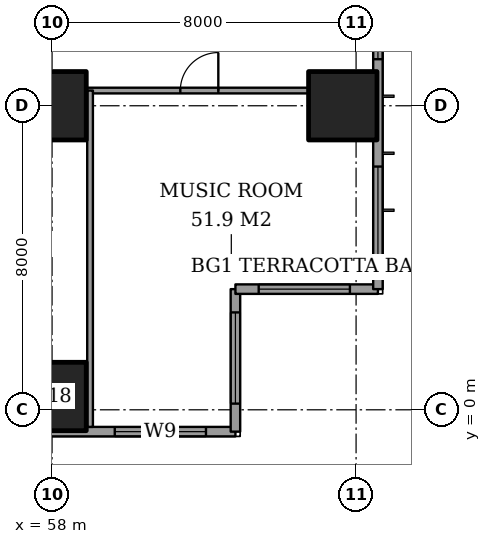
"""IFC4 building model, lengths in metres.
Left out: names, types, materials, properties, quantities, classifications, styles, units other than length and angle.
Written with IfcOpenShell. Run it as: python <this file> out.ifc"""

import sys

from ifc_helpers import new_model, si_unit, direction, frame, frame_2d, origin, origin_2d, place, context, subcontext, project, spatial, rectangle, extrude, element, fill, save


model = new_model("IFC4")
c1 = context("Model", 3, precision=1e-05, world=origin(), true_north=direction((0.0, 1.0)))
c2 = subcontext(c1, "Body", "Model", "MODEL_VIEW")
j1 = project(units=[si_unit("LENGTHUNIT", "METRE"), si_unit("PLANEANGLEUNIT", "RADIAN")], contexts=[c1])
p1 = place(None, origin())
s1 = spatial("IfcSite", under=j1, at=p1, CompositionType="ELEMENT")
p2 = place(p1, origin())
s2 = spatial("IfcBuilding", under=s1, at=p2, CompositionType="ELEMENT")
p3 = place(p2, frame((0.0, 0.0, 193.0)))
s3 = spatial("IfcBuildingStorey", under=s2, at=p3, CompositionType="ELEMENT", Elevation=193.0)
for number, where, z_axis, x_axis in (
    (1, (58.0, 0.35, 0.0), (0.0, 0.0, 1.0), (1.0, 0.0, 0.0)),
    (2, (58.0, 8.0, 0.0), (0.0, 0.0, 1.0), (1.0, 0.0, 0.0)),
    (3, (65.65, 8.0, 0.0), (0.0, 0.0, 1.0), (1.0, 0.0, 0.0)),
):
    element("IfcColumn", number, at=place(p3, frame(where, z_axis=z_axis, x_axis=x_axis)), inside=s3, PredefinedType="COLUMN", context=c2, shape_type="SweptSolid", body=[
        extrude(rectangle(XDim=1.8, YDim=1.8, at=origin_2d()), origin(), (0.0, 0.0, 1.0), 3.6),
    ])
p4 = place(p3, frame((41.425, -0.575, 0.0), z_axis=(0.0, 0.0, 1.0), x_axis=(1.0, 0.0, 0.0)))
e4 = element("IfcWall", 4, at=p4, inside=s3, PredefinedType="SOLIDWALL", context=c2, shape_type="SweptSolid", body=[
    extrude(rectangle(XDim=21.4, YDim=0.25, at=frame_2d((10.7, 0.0))), origin(), (0.0, 0.0, 1.0), 3.6),
])
p5 = place(p4, frame((3.05, 0.0, 0.2)))
e5 = element("IfcOpeningElement", 5, at=p5, cuts=e4, PredefinedType="OPENING", context=c2, shape_type="SweptSolid", body=[
    extrude(rectangle(XDim=2.4, YDim=2.4, at=frame_2d((1.2, 1.2))), frame((0.0, 0.135, 0.0), z_axis=(0.0, -1.0, 0.0), x_axis=(1.0, 0.0, 0.0)), (0.0, 0.0, 1.0), 0.27),
])
p6 = place(p4, frame((6.9, 0.0, 0.2)))
e6 = element("IfcOpeningElement", 6, at=p6, cuts=e4, PredefinedType="OPENING", context=c2, shape_type="SweptSolid", body=[
    extrude(rectangle(XDim=0.6, YDim=2.4, at=frame_2d((0.3, 1.2))), frame((0.0, 0.135, 0.0), z_axis=(0.0, -1.0, 0.0), x_axis=(1.0, 0.0, 0.0)), (0.0, 0.0, 1.0), 0.27),
])
p7 = place(p4, frame((9.925, 0.0, 0.2)))
e7 = element("IfcOpeningElement", 7, at=p7, cuts=e4, PredefinedType="OPENING", context=c2, shape_type="SweptSolid", body=[
    extrude(rectangle(XDim=1.2, YDim=2.4, at=frame_2d((0.6, 1.2))), frame((0.0, 0.135, 0.0), z_axis=(0.0, -1.0, 0.0), x_axis=(1.0, 0.0, 0.0)), (0.0, 0.0, 1.0), 0.27),
])
p8 = place(p4, frame((12.425, 0.0, 0.2)))
e8 = element("IfcOpeningElement", 8, at=p8, cuts=e4, PredefinedType="OPENING", context=c2, shape_type="SweptSolid", body=[
    extrude(rectangle(XDim=2.4, YDim=2.4, at=frame_2d((1.2, 1.2))), frame((0.0, 0.135, 0.0), z_axis=(0.0, -1.0, 0.0), x_axis=(1.0, 0.0, 0.0)), (0.0, 0.0, 1.0), 0.27),
])
p9 = place(p4, frame((18.225, 0.0, 0.2)))
e9 = element("IfcOpeningElement", 9, at=p9, cuts=e4, PredefinedType="OPENING", context=c2, shape_type="SweptSolid", body=[
    extrude(rectangle(XDim=2.4, YDim=2.4, at=frame_2d((1.2, 1.2))), frame((0.0, 0.135, 0.0), z_axis=(0.0, -1.0, 0.0), x_axis=(1.0, 0.0, 0.0)), (0.0, 0.0, 1.0), 0.27),
])
p10 = place(p3, frame((62.825, -0.575, 0.0), z_axis=(0.0, 0.0, 1.0), x_axis=(0.0, 1.0, 0.0)))
e10 = element("IfcWall", 10, at=p10, inside=s3, PredefinedType="SOLIDWALL", context=c2, shape_type="SweptSolid", body=[
    extrude(rectangle(XDim=3.75, YDim=0.25, at=frame_2d((1.875, 0.0))), origin(), (0.0, 0.0, 1.0), 3.6),
])
p11 = place(p10, frame((0.738, 0.0, 0.2)))
e11 = element("IfcOpeningElement", 11, at=p11, cuts=e10, PredefinedType="OPENING", context=c2, shape_type="SweptSolid", body=[
    extrude(rectangle(XDim=2.4, YDim=2.4, at=frame_2d((1.2, 1.2))), frame((0.0, 0.135, 0.0), z_axis=(0.0, -1.0, 0.0), x_axis=(1.0, 0.0, 0.0)), (0.0, 0.0, 1.0), 0.27),
])
p12 = place(p3, frame((62.825, 3.175, 0.0), z_axis=(0.0, 0.0, 1.0), x_axis=(1.0, 0.0, 0.0)))
e12 = element("IfcWall", 12, at=p12, inside=s3, PredefinedType="SOLIDWALL", context=c2, shape_type="SweptSolid", body=[
    extrude(rectangle(XDim=3.75, YDim=0.25, at=frame_2d((1.875, 0.0))), origin(), (0.0, 0.0, 1.0), 3.6),
])
p13 = place(p12, frame((0.613, 0.0, 0.2)))
e13 = element("IfcOpeningElement", 13, at=p13, cuts=e12, PredefinedType="OPENING", context=c2, shape_type="SweptSolid", body=[
    extrude(rectangle(XDim=2.4, YDim=2.4, at=frame_2d((1.2, 1.2))), frame((0.0, 0.135, 0.0), z_axis=(0.0, -1.0, 0.0), x_axis=(1.0, 0.0, 0.0)), (0.0, 0.0, 1.0), 0.27),
])
p14 = place(p3, frame((66.575, 3.175, 0.0), z_axis=(0.0, 0.0, 1.0), x_axis=(0.0, 1.0, 0.0)))
e14 = element("IfcWall", 14, at=p14, inside=s3, PredefinedType="SOLIDWALL", context=c2, shape_type="SweptSolid", body=[
    extrude(rectangle(XDim=41.65, YDim=0.25, at=frame_2d((20.825, 0.0))), origin(), (0.0, 0.0, 1.0), 3.6),
])
p15 = place(p14, frame((0.825, 0.0, 0.2)))
e15 = element("IfcOpeningElement", 15, at=p15, cuts=e14, PredefinedType="OPENING", context=c2, shape_type="SweptSolid", body=[
    extrude(rectangle(XDim=2.4, YDim=2.4, at=frame_2d((1.2, 1.2))), frame((0.0, 0.135, 0.0), z_axis=(0.0, -1.0, 0.0), x_axis=(1.0, 0.0, 0.0)), (0.0, 0.0, 1.0), 0.27),
])
p16 = place(p14, frame((6.05, 0.0, 0.2)))
e16 = element("IfcOpeningElement", 16, at=p16, cuts=e14, PredefinedType="OPENING", context=c2, shape_type="SweptSolid", body=[
    extrude(rectangle(XDim=1.2, YDim=2.4, at=frame_2d((0.6, 1.2))), frame((0.0, 0.135, 0.0), z_axis=(0.0, -1.0, 0.0), x_axis=(1.0, 0.0, 0.0)), (0.0, 0.0, 1.0), 0.27),
])
p17 = place(p14, frame((8.475, 0.0, 0.2)))
e17 = element("IfcOpeningElement", 17, at=p17, cuts=e14, PredefinedType="OPENING", context=c2, shape_type="SweptSolid", body=[
    extrude(rectangle(XDim=2.4, YDim=2.4, at=frame_2d((1.2, 1.2))), frame((0.0, 0.135, 0.0), z_axis=(0.0, -1.0, 0.0), x_axis=(1.0, 0.0, 0.0)), (0.0, 0.0, 1.0), 0.27),
])
p18 = place(p14, frame((15.675, 0.0, 0.2)))
e18 = element("IfcOpeningElement", 18, at=p18, cuts=e14, PredefinedType="OPENING", context=c2, shape_type="SweptSolid", body=[
    extrude(rectangle(XDim=2.4, YDim=2.4, at=frame_2d((1.2, 1.2))), frame((0.0, 0.135, 0.0), z_axis=(0.0, -1.0, 0.0), x_axis=(1.0, 0.0, 0.0)), (0.0, 0.0, 1.0), 0.27),
])
p19 = place(p14, frame((23.625, 0.0, 0.2)))
e19 = element("IfcOpeningElement", 19, at=p19, cuts=e14, PredefinedType="OPENING", context=c2, shape_type="SweptSolid", body=[
    extrude(rectangle(XDim=2.4, YDim=2.4, at=frame_2d((1.2, 1.2))), frame((0.0, 0.135, 0.0), z_axis=(0.0, -1.0, 0.0), x_axis=(1.0, 0.0, 0.0)), (0.0, 0.0, 1.0), 0.27),
])
p20 = place(p14, frame((30.775, 0.0, 0.2)))
e20 = element("IfcOpeningElement", 20, at=p20, cuts=e14, PredefinedType="OPENING", context=c2, shape_type="SweptSolid", body=[
    extrude(rectangle(XDim=2.4, YDim=2.4, at=frame_2d((1.2, 1.2))), frame((0.0, 0.135, 0.0), z_axis=(0.0, -1.0, 0.0), x_axis=(1.0, 0.0, 0.0)), (0.0, 0.0, 1.0), 0.27),
])
p21 = place(p14, frame((34.55, 0.0, 0.2)))
e21 = element("IfcOpeningElement", 21, at=p21, cuts=e14, PredefinedType="OPENING", context=c2, shape_type="SweptSolid", body=[
    extrude(rectangle(XDim=1.2, YDim=2.4, at=frame_2d((0.6, 1.2))), frame((0.0, 0.135, 0.0), z_axis=(0.0, -1.0, 0.0), x_axis=(1.0, 0.0, 0.0)), (0.0, 0.0, 1.0), 0.27),
])
p22 = place(p14, frame((38.425, 0.0, 0.2)))
e22 = element("IfcOpeningElement", 22, at=p22, cuts=e14, PredefinedType="OPENING", context=c2, shape_type="SweptSolid", body=[
    extrude(rectangle(XDim=2.4, YDim=2.4, at=frame_2d((1.2, 1.2))), frame((0.0, 0.135, 0.0), z_axis=(0.0, -1.0, 0.0), x_axis=(1.0, 0.0, 0.0)), (0.0, 0.0, 1.0), 0.27),
])
p23 = place(p3, frame((58.9, 8.4, 0.0), z_axis=(0.0, 0.0, 1.0), x_axis=(1.0, 0.0, 0.0)))
e23 = element("IfcWall", 23, at=p23, inside=s3, PredefinedType="PARTITIONING", context=c2, shape_type="SweptSolid", body=[
    extrude(rectangle(XDim=5.85, YDim=0.15, at=frame_2d((2.925, 0.0))), origin(), (0.0, 0.0, 1.0), 3.35),
])
p24 = place(p23, frame((2.475, 0.0, 0.0)))
e24 = element("IfcOpeningElement", 24, at=p24, cuts=e23, PredefinedType="OPENING", context=c2, shape_type="SweptSolid", body=[
    extrude(rectangle(XDim=1.0, YDim=2.1, at=frame_2d((0.5, 1.05))), frame((0.0, 0.085, 0.0), z_axis=(0.0, -1.0, 0.0), x_axis=(1.0, 0.0, 0.0)), (0.0, 0.0, 1.0), 0.17),
])
p25 = place(p3, frame((59.0, -0.45, 0.0), z_axis=(0.0, 0.0, 1.0), x_axis=(0.0, 1.0, 0.0)))
e25 = element("IfcWall", 25, at=p25, inside=s3, PredefinedType="PARTITIONING", context=c2, shape_type="SweptSolid", body=[
    extrude(rectangle(XDim=8.85, YDim=0.15, at=frame_2d((4.425, 0.0))), origin(), (0.0, 0.0, 1.0), 3.35),
])
p26 = place(p9, origin())
e26 = element("IfcWindow", 26, at=p26, inside=s3, PartitioningType="SINGLE_PANEL", PredefinedType="WINDOW", context=c2, shape_type="SweptSolid", body=[
    extrude(rectangle(XDim=2.4, YDim=2.4, at=frame_2d((1.2, 1.2))), frame((0.0, 0.03, 0.0), z_axis=(0.0, -1.0, 0.0), x_axis=(1.0, 0.0, 0.0)), (0.0, 0.0, 1.0), 0.06),
])
fill(e9, e26)
p27 = place(p11, origin())
e27 = element("IfcWindow", 27, at=p27, inside=s3, PartitioningType="SINGLE_PANEL", PredefinedType="WINDOW", context=c2, shape_type="SweptSolid", body=[
    extrude(rectangle(XDim=2.4, YDim=2.4, at=frame_2d((1.2, 1.2))), frame((0.0, 0.03, 0.0), z_axis=(0.0, -1.0, 0.0), x_axis=(1.0, 0.0, 0.0)), (0.0, 0.0, 1.0), 0.06),
])
fill(e11, e27)
p28 = place(p13, origin())
e28 = element("IfcWindow", 28, at=p28, inside=s3, PartitioningType="SINGLE_PANEL", PredefinedType="WINDOW", context=c2, shape_type="SweptSolid", body=[
    extrude(rectangle(XDim=2.4, YDim=2.4, at=frame_2d((1.2, 1.2))), frame((0.0, 0.03, 0.0), z_axis=(0.0, -1.0, 0.0), x_axis=(1.0, 0.0, 0.0)), (0.0, 0.0, 1.0), 0.06),
])
fill(e13, e28)
p29 = place(p15, origin())
e29 = element("IfcWindow", 29, at=p29, inside=s3, PartitioningType="SINGLE_PANEL", PredefinedType="WINDOW", context=c2, shape_type="SweptSolid", body=[
    extrude(rectangle(XDim=2.4, YDim=2.4, at=frame_2d((1.2, 1.2))), frame((0.0, 0.03, 0.0), z_axis=(0.0, -1.0, 0.0), x_axis=(1.0, 0.0, 0.0)), (0.0, 0.0, 1.0), 0.06),
])
fill(e15, e29)
p30 = place(p16, origin())
e30 = element("IfcWindow", 30, at=p30, inside=s3, PartitioningType="SINGLE_PANEL", PredefinedType="WINDOW", context=c2, shape_type="SweptSolid", body=[
    extrude(rectangle(XDim=1.2, YDim=2.4, at=frame_2d((0.6, 1.2))), frame((0.0, 0.03, 0.0), z_axis=(0.0, -1.0, 0.0), x_axis=(1.0, 0.0, 0.0)), (0.0, 0.0, 1.0), 0.06),
])
fill(e16, e30)
p31 = place(p24, origin())
e31 = element("IfcDoor", 31, at=p31, inside=s3, OperationType="SINGLE_SWING_LEFT", PredefinedType="DOOR", context=c2, shape_type="SweptSolid", body=[
    extrude(rectangle(XDim=1.0, YDim=2.1, at=frame_2d((0.5, 1.05))), frame((0.0, 0.025, 0.0), z_axis=(0.0, -1.0, 0.0), x_axis=(1.0, 0.0, 0.0)), (0.0, 0.0, 1.0), 0.05),
])
fill(e24, e31)
save(model, sys.argv[1])
